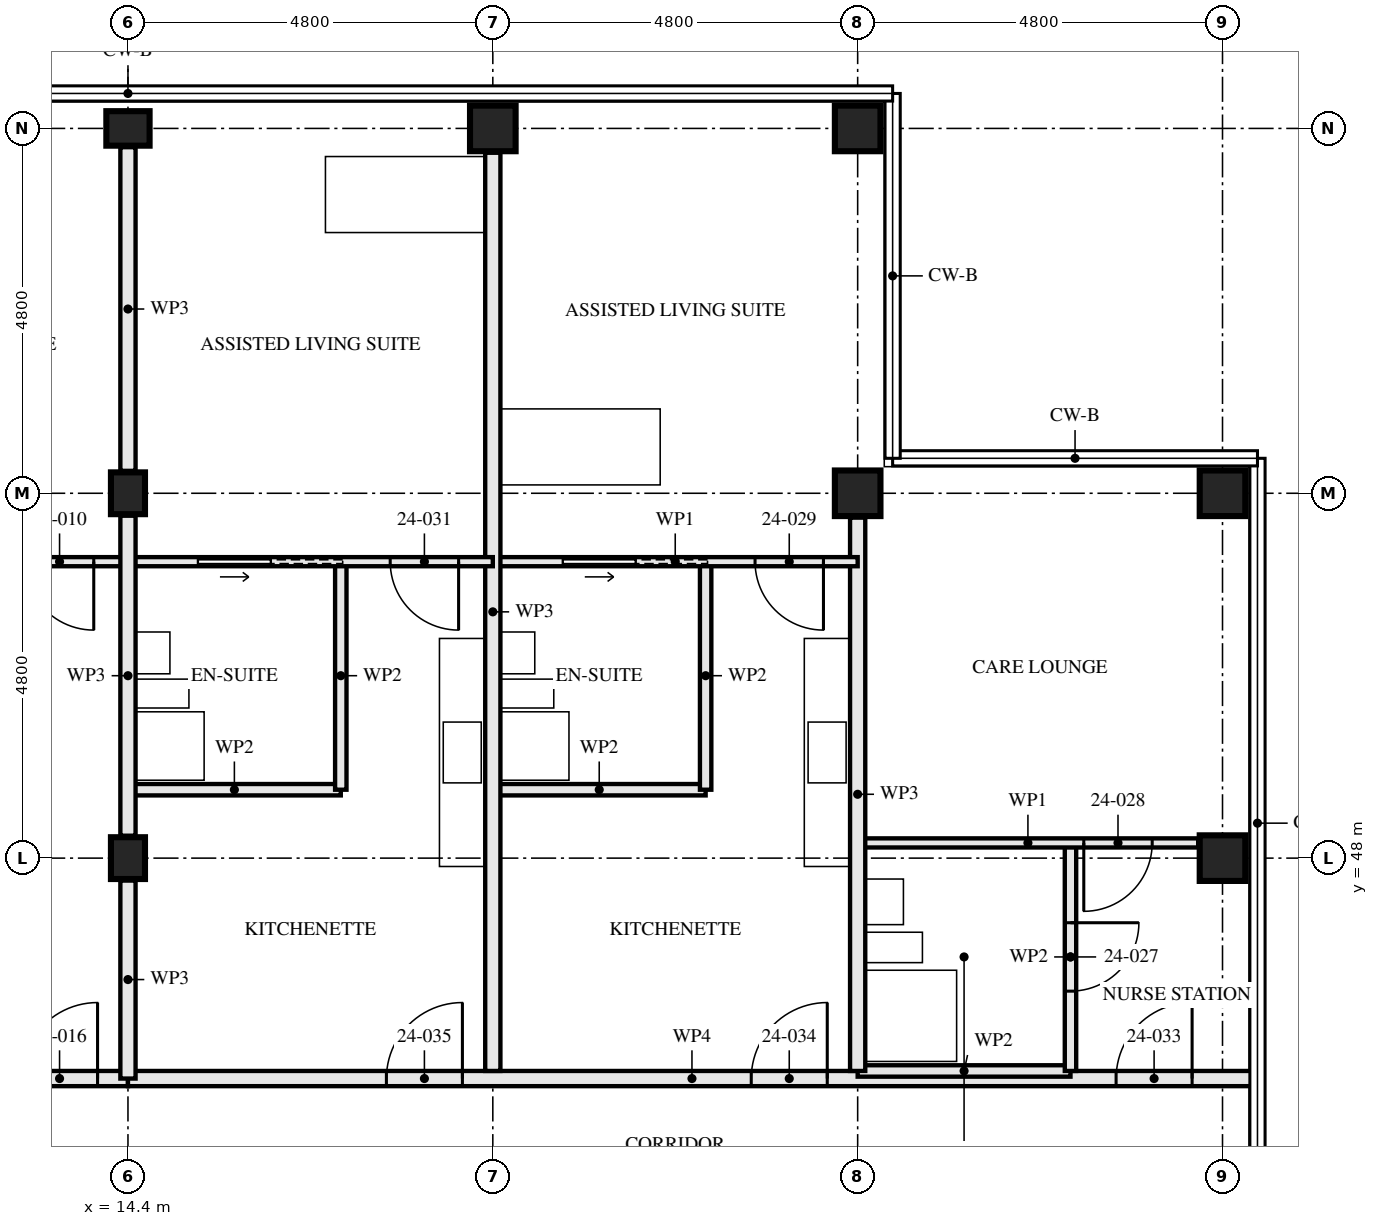
"""IFC4 building model, lengths in metres.
Left out: names, types, materials, properties, quantities, classifications, styles, units other than length and angle.
Written with IfcOpenShell. Run it as: python <this file> out.ifc"""

import sys

from ifc_helpers import new_model, si_unit, direction, frame, frame_2d, origin, origin_2d, place, context, subcontext, project, spatial, rectangle, hollow_rectangle, i_section, extrude, element, fill, save


model = new_model("IFC4")
c1 = context("Model", 3, precision=1e-05, world=origin(), true_north=direction((0.0, 1.0)))
c2 = subcontext(c1, "Body", "Model", "MODEL_VIEW")
j1 = project(units=[si_unit("LENGTHUNIT", "METRE"), si_unit("PLANEANGLEUNIT", "RADIAN")], contexts=[c1])
p1 = place(None, origin())
s1 = spatial("IfcSite", under=j1, at=p1, CompositionType="ELEMENT")
p2 = place(p1, origin())
s2 = spatial("IfcBuilding", under=s1, at=p2, CompositionType="ELEMENT")
p3 = place(p2, frame((0.0, 0.0, 91.0)))
s3 = spatial("IfcBuildingStorey", under=s2, at=p3, CompositionType="ELEMENT", Elevation=91.0)
for number, where, z_axis, x_axis in (
    (1, (14.4, 48.0, 0.0), (0.0, 0.0, 1.0), (1.0, 0.0, 0.0)),
    (2, (14.4, 52.8, 0.0), (0.0, 0.0, 1.0), (1.0, 0.0, 0.0)),
):
    element("IfcColumn", number, at=place(p3, frame(where, z_axis=z_axis, x_axis=x_axis)), inside=s3, PredefinedType="COLUMN", context=c2, shape_type="SweptSolid", body=[
        extrude(i_section(OverallWidth=0.448, OverallDepth=0.55, WebThickness=0.072, FlangeThickness=0.115, FilletRadius=0.015, at=origin_2d()), origin(), (0.0, 0.0, 1.0), 3.5),
    ])
p4 = place(p3, frame((14.4, 57.6, 0.0), z_axis=(0.0, 0.0, 1.0), x_axis=(0.0, 1.0, 0.0)))
e3 = element("IfcColumn", 3, at=p4, inside=s3, PredefinedType="COLUMN", context=c2, shape_type="SweptSolid", body=[
    extrude(i_section(OverallWidth=0.454, OverallDepth=0.569, WebThickness=0.078, FlangeThickness=0.125, FilletRadius=0.015, at=origin_2d()), origin(), (0.0, 0.0, 1.0), 3.5),
])
for number, where, z_axis, x_axis in (
    (4, (19.2, 57.6, 0.0), (0.0, 0.0, 1.0), (0.0, 1.0, 0.0)),
    (5, (24.0, 52.8, 0.0), (0.0, 0.0, 1.0), (0.0, 1.0, 0.0)),
    (6, (24.0, 57.6, 0.0), (0.0, 0.0, 1.0), (0.0, 1.0, 0.0)),
    (7, (28.8, 48.0, 0.0), (0.0, 0.0, 1.0), (1.0, 0.0, 0.0)),
    (8, (28.8, 52.8, 0.0), (0.0, 0.0, 1.0), (0.0, 1.0, 0.0)),
):
    element("IfcColumn", number, at=place(p3, frame(where, z_axis=z_axis, x_axis=x_axis)), inside=s3, PredefinedType="COLUMN", context=c2, shape_type="SweptSolid", body=[
        extrude(hollow_rectangle(XDim=0.6, YDim=0.6, WallThickness=0.08, at=origin_2d()), origin(), (0.0, 0.0, 1.0), 3.5),
    ])
p5 = place(p3, frame((14.4, 51.9, 0.0), z_axis=(0.0, 0.0, 1.0), x_axis=(-1.0, 0.0, 0.0)))
e9 = element("IfcWall", 9, at=p5, inside=s3, PredefinedType="PARTITIONING", context=c2, shape_type="SweptSolid", body=[
    extrude(rectangle(XDim=4.8, YDim=0.12, at=frame_2d((2.4, 0.0))), origin(), (0.0, 0.0, 1.0), 3.33),
])
p6 = place(p5, frame((0.45, 0.0, 0.0)))
e10 = element("IfcOpeningElement", 10, at=p6, cuts=e9, PredefinedType="OPENING", context=c2, shape_type="SweptSolid", body=[
    extrude(rectangle(XDim=0.9, YDim=2.1, at=frame_2d((0.45, 1.05))), frame((0.0, 0.071, 0.0), z_axis=(0.0, -1.0, 0.0), x_axis=(1.0, 0.0, 0.0)), (0.0, 0.0, 1.0), 0.141),
])
p7 = place(p5, frame((2.925, 0.0, 0.0)))
e11 = element("IfcOpeningElement", 11, at=p7, cuts=e9, PredefinedType="OPENING", context=c2, shape_type="SweptSolid", body=[
    extrude(rectangle(XDim=0.95, YDim=2.1, at=frame_2d((0.475, 1.05))), frame((0.0, 0.071, 0.0), z_axis=(0.0, -1.0, 0.0), x_axis=(1.0, 0.0, 0.0)), (0.0, 0.0, 1.0), 0.141),
])
p8 = place(p3, frame((14.4, 45.1, 0.0), z_axis=(0.0, 0.0, 1.0), x_axis=(-1.0, 0.0, 0.0)))
e12 = element("IfcWall", 12, at=p8, inside=s3, PredefinedType="PARTITIONING", context=c2, shape_type="SweptSolid", body=[
    extrude(rectangle(XDim=9.6, YDim=0.2, at=frame_2d((4.8, 0.0))), origin(), (0.0, 0.0, 1.0), 3.33),
])
p9 = place(p8, frame((0.4, 0.0, 0.0)))
e13 = element("IfcOpeningElement", 13, at=p9, cuts=e12, PredefinedType="OPENING", context=c2, shape_type="SweptSolid", body=[
    extrude(rectangle(XDim=1.0, YDim=2.1, at=frame_2d((0.5, 1.05))), frame((0.0, 0.111, 0.0), z_axis=(0.0, -1.0, 0.0), x_axis=(1.0, 0.0, 0.0)), (0.0, 0.0, 1.0), 0.221),
])
p10 = place(p8, frame((5.2, 0.0, 0.0)))
e14 = element("IfcOpeningElement", 14, at=p10, cuts=e12, PredefinedType="OPENING", context=c2, shape_type="SweptSolid", body=[
    extrude(rectangle(XDim=1.0, YDim=2.1, at=frame_2d((0.5, 1.05))), frame((0.0, 0.111, 0.0), z_axis=(0.0, -1.0, 0.0), x_axis=(1.0, 0.0, 0.0)), (0.0, 0.0, 1.0), 0.221),
])
p11 = place(p3, frame((26.8, 48.2, 0.0), z_axis=(0.0, 0.0, 1.0), x_axis=(0.0, -1.0, 0.0)))
e15 = element("IfcWall", 15, at=p11, inside=s3, PredefinedType="PARTITIONING", context=c2, shape_type="SweptSolid", body=[
    extrude(rectangle(XDim=3.0, YDim=0.15, at=frame_2d((1.5, 0.0))), origin(), (0.0, 0.0, 1.0), 2.55),
])
p12 = place(p11, frame((1.05, 0.0, 0.0)))
e16 = element("IfcOpeningElement", 16, at=p12, cuts=e15, PredefinedType="OPENING", context=c2, shape_type="SweptSolid", body=[
    extrude(rectangle(XDim=0.9, YDim=2.1, at=frame_2d((0.45, 1.05))), frame((0.0, 0.085, 0.0), z_axis=(0.0, -1.0, 0.0), x_axis=(1.0, 0.0, 0.0)), (0.0, 0.0, 1.0), 0.171),
])
p13 = place(p3, frame((26.8, 45.2, 0.0), z_axis=(0.0, 0.0, 1.0), x_axis=(-1.0, 0.0, 0.0)))
e17 = element("IfcWall", 17, at=p13, inside=s3, PredefinedType="PARTITIONING", context=c2, shape_type="SweptSolid", body=[
    extrude(rectangle(XDim=2.8, YDim=0.15, at=frame_2d((1.4, 0.0))), origin(), (0.0, 0.0, 1.0), 3.33),
])
p14 = place(p3, frame((28.48, 48.2, 0.0), z_axis=(0.0, 0.0, 1.0), x_axis=(-1.0, 0.0, 0.0)))
e18 = element("IfcWall", 18, at=p14, inside=s3, PredefinedType="PARTITIONING", context=c2, shape_type="SweptSolid", body=[
    extrude(rectangle(XDim=4.48, YDim=0.12, at=frame_2d((2.24, 0.0))), origin(), (0.0, 0.0, 1.0), 3.33),
])
p15 = place(p14, frame((0.605, 0.0, 0.0)))
e19 = element("IfcOpeningElement", 19, at=p15, cuts=e18, PredefinedType="OPENING", context=c2, shape_type="SweptSolid", body=[
    extrude(rectangle(XDim=0.9, YDim=2.1, at=frame_2d((0.45, 1.05))), frame((0.0, 0.071, 0.0), z_axis=(0.0, -1.0, 0.0), x_axis=(1.0, 0.0, 0.0)), (0.0, 0.0, 1.0), 0.141),
])
p16 = place(p3, frame((24.0, 52.48, 0.0), z_axis=(0.0, 0.0, 1.0), x_axis=(0.0, -1.0, 0.0)))
e20 = element("IfcWall", 20, at=p16, inside=s3, PredefinedType="PARTITIONING", context=c2, shape_type="SweptSolid", body=[
    extrude(rectangle(XDim=7.28, YDim=0.2, at=frame_2d((3.64, 0.0))), origin(), (0.0, 0.0, 1.0), 2.55),
])
p17 = place(p3, frame((22.0, 51.9, 0.0), z_axis=(0.0, 0.0, 1.0), x_axis=(0.0, -1.0, 0.0)))
e21 = element("IfcWall", 21, at=p17, inside=s3, PredefinedType="PARTITIONING", context=c2, shape_type="SweptSolid", body=[
    extrude(rectangle(XDim=3.0, YDim=0.15, at=frame_2d((1.5, 0.0))), origin(), (0.0, 0.0, 1.0), 3.33),
])
p18 = place(p3, frame((22.0, 48.9, 0.0), z_axis=(0.0, 0.0, 1.0), x_axis=(-1.0, 0.0, 0.0)))
e22 = element("IfcWall", 22, at=p18, inside=s3, PredefinedType="PARTITIONING", context=c2, shape_type="SweptSolid", body=[
    extrude(rectangle(XDim=2.8, YDim=0.15, at=frame_2d((1.4, 0.0))), origin(), (0.0, 0.0, 1.0), 3.33),
])
p19 = place(p3, frame((24.0, 51.9, 0.0), z_axis=(0.0, 0.0, 1.0), x_axis=(-1.0, 0.0, 0.0)))
e23 = element("IfcWall", 23, at=p19, inside=s3, PredefinedType="PARTITIONING", context=c2, shape_type="SweptSolid", body=[
    extrude(rectangle(XDim=4.8, YDim=0.12, at=frame_2d((2.4, 0.0))), origin(), (0.0, 0.0, 1.0), 3.33),
])
p20 = place(p19, frame((0.45, 0.0, 0.0)))
e24 = element("IfcOpeningElement", 24, at=p20, cuts=e23, PredefinedType="OPENING", context=c2, shape_type="SweptSolid", body=[
    extrude(rectangle(XDim=0.9, YDim=2.1, at=frame_2d((0.45, 1.05))), frame((0.0, 0.071, 0.0), z_axis=(0.0, -1.0, 0.0), x_axis=(1.0, 0.0, 0.0)), (0.0, 0.0, 1.0), 0.141),
])
p21 = place(p19, frame((2.925, 0.0, 0.0)))
e25 = element("IfcOpeningElement", 25, at=p21, cuts=e23, PredefinedType="OPENING", context=c2, shape_type="SweptSolid", body=[
    extrude(rectangle(XDim=0.95, YDim=2.1, at=frame_2d((0.475, 1.05))), frame((0.0, 0.071, 0.0), z_axis=(0.0, -1.0, 0.0), x_axis=(1.0, 0.0, 0.0)), (0.0, 0.0, 1.0), 0.141),
])
p22 = place(p3, frame((19.2, 57.28, 0.0), z_axis=(0.0, 0.0, 1.0), x_axis=(0.0, -1.0, 0.0)))
e26 = element("IfcWall", 26, at=p22, inside=s3, PredefinedType="PARTITIONING", context=c2, shape_type="SweptSolid", body=[
    extrude(rectangle(XDim=12.08, YDim=0.2, at=frame_2d((6.04, 0.0))), origin(), (0.0, 0.0, 1.0), 2.55),
])
p23 = place(p3, frame((17.2, 51.9, 0.0), z_axis=(0.0, 0.0, 1.0), x_axis=(0.0, -1.0, 0.0)))
e27 = element("IfcWall", 27, at=p23, inside=s3, PredefinedType="PARTITIONING", context=c2, shape_type="SweptSolid", body=[
    extrude(rectangle(XDim=3.0, YDim=0.15, at=frame_2d((1.5, 0.0))), origin(), (0.0, 0.0, 1.0), 3.33),
])
p24 = place(p3, frame((17.2, 48.9, 0.0), z_axis=(0.0, 0.0, 1.0), x_axis=(-1.0, 0.0, 0.0)))
e28 = element("IfcWall", 28, at=p24, inside=s3, PredefinedType="PARTITIONING", context=c2, shape_type="SweptSolid", body=[
    extrude(rectangle(XDim=2.8, YDim=0.15, at=frame_2d((1.4, 0.0))), origin(), (0.0, 0.0, 1.0), 3.33),
])
p25 = place(p3, frame((19.2, 51.9, 0.0), z_axis=(0.0, 0.0, 1.0), x_axis=(-1.0, 0.0, 0.0)))
e29 = element("IfcWall", 29, at=p25, inside=s3, PredefinedType="PARTITIONING", context=c2, shape_type="SweptSolid", body=[
    extrude(rectangle(XDim=4.8, YDim=0.12, at=frame_2d((2.4, 0.0))), origin(), (0.0, 0.0, 1.0), 3.33),
])
p26 = place(p25, frame((0.45, 0.0, 0.0)))
e30 = element("IfcOpeningElement", 30, at=p26, cuts=e29, PredefinedType="OPENING", context=c2, shape_type="SweptSolid", body=[
    extrude(rectangle(XDim=0.9, YDim=2.1, at=frame_2d((0.45, 1.05))), frame((0.0, 0.071, 0.0), z_axis=(0.0, -1.0, 0.0), x_axis=(1.0, 0.0, 0.0)), (0.0, 0.0, 1.0), 0.141),
])
p27 = place(p25, frame((2.925, 0.0, 0.0)))
e31 = element("IfcOpeningElement", 31, at=p27, cuts=e29, PredefinedType="OPENING", context=c2, shape_type="SweptSolid", body=[
    extrude(rectangle(XDim=0.95, YDim=2.1, at=frame_2d((0.475, 1.05))), frame((0.0, 0.071, 0.0), z_axis=(0.0, -1.0, 0.0), x_axis=(1.0, 0.0, 0.0)), (0.0, 0.0, 1.0), 0.141),
])
p28 = place(p3, frame((29.24, 45.1, 0.0), z_axis=(0.0, 0.0, 1.0), x_axis=(-1.0, 0.0, 0.0)))
e32 = element("IfcWall", 32, at=p28, inside=s3, PredefinedType="PARTITIONING", context=c2, shape_type="SweptSolid", body=[
    extrude(rectangle(XDim=14.84, YDim=0.2, at=frame_2d((7.42, 0.0))), origin(), (0.0, 0.0, 1.0), 2.32),
])
p29 = place(p28, frame((0.84, 0.0, 0.0)))
e33 = element("IfcOpeningElement", 33, at=p29, cuts=e32, PredefinedType="OPENING", context=c2, shape_type="SweptSolid", body=[
    extrude(rectangle(XDim=1.0, YDim=2.1, at=frame_2d((0.5, 1.05))), frame((0.0, 0.111, 0.0), z_axis=(0.0, -1.0, 0.0), x_axis=(1.0, 0.0, 0.0)), (0.0, 0.0, 1.0), 0.221),
])
p30 = place(p28, frame((5.64, 0.0, 0.0)))
e34 = element("IfcOpeningElement", 34, at=p30, cuts=e32, PredefinedType="OPENING", context=c2, shape_type="SweptSolid", body=[
    extrude(rectangle(XDim=1.0, YDim=2.1, at=frame_2d((0.5, 1.05))), frame((0.0, 0.111, 0.0), z_axis=(0.0, -1.0, 0.0), x_axis=(1.0, 0.0, 0.0)), (0.0, 0.0, 1.0), 0.221),
])
p31 = place(p28, frame((10.44, 0.0, 0.0)))
e35 = element("IfcOpeningElement", 35, at=p31, cuts=e32, PredefinedType="OPENING", context=c2, shape_type="SweptSolid", body=[
    extrude(rectangle(XDim=1.0, YDim=2.1, at=frame_2d((0.5, 1.05))), frame((0.0, 0.111, 0.0), z_axis=(0.0, -1.0, 0.0), x_axis=(1.0, 0.0, 0.0)), (0.0, 0.0, 1.0), 0.221),
])
p32 = place(p3, frame((14.4, 45.1, 0.0), z_axis=(0.0, 0.0, 1.0), x_axis=(0.0, 1.0, 0.0)))
e36 = element("IfcWall", 36, at=p32, inside=s3, PredefinedType="PARTITIONING", context=c2, shape_type="SweptSolid", body=[
    extrude(rectangle(XDim=2.605, YDim=0.2, at=frame_2d((1.302, 0.0))), origin(), (0.0, 0.0, 1.0), 2.32),
])
p33 = place(p3, frame((14.4, 48.295, 0.0), z_axis=(0.0, 0.0, 1.0), x_axis=(0.0, 1.0, 0.0)))
e37 = element("IfcWall", 37, at=p33, inside=s3, PredefinedType="PARTITIONING", context=c2, shape_type="SweptSolid", body=[
    extrude(rectangle(XDim=4.21, YDim=0.2, at=frame_2d((2.105, 0.0))), origin(), (0.0, 0.0, 1.0), 2.32),
])
p34 = place(p3, frame((14.4, 53.095, 0.0), z_axis=(0.0, 0.0, 1.0), x_axis=(0.0, 1.0, 0.0)))
e38 = element("IfcWall", 38, at=p34, inside=s3, PredefinedType="PARTITIONING", context=c2, shape_type="SweptSolid", body=[
    extrude(rectangle(XDim=4.258, YDim=0.2, at=frame_2d((2.129, 0.0))), origin(), (0.0, 0.0, 1.0), 2.32),
])
p35 = place(p6, origin())
e39 = element("IfcDoor", 39, at=p35, inside=s3, OperationType="SINGLE_SWING_RIGHT", PredefinedType="DOOR", context=c2, shape_type="SweptSolid", body=[
    extrude(rectangle(XDim=0.9, YDim=2.1, at=frame_2d((0.45, 1.05))), frame((0.0, 0.022, 0.0), z_axis=(0.0, -1.0, 0.0), x_axis=(1.0, 0.0, 0.0)), (0.0, 0.0, 1.0), 0.044),
])
fill(e10, e39)
p36 = place(p9, frame((1.0, 0.0, 0.0), z_axis=(0.0, 0.0, 1.0), x_axis=(-1.0, 0.0, 0.0)))
e40 = element("IfcDoor", 40, at=p36, inside=s3, OperationType="SINGLE_SWING_LEFT", PredefinedType="DOOR", context=c2, shape_type="SweptSolid", body=[
    extrude(rectangle(XDim=1.0, YDim=2.1, at=frame_2d((0.5, 1.05))), frame((0.0, 0.027, 0.0), z_axis=(0.0, -1.0, 0.0), x_axis=(1.0, 0.0, 0.0)), (0.0, 0.0, 1.0), 0.054),
])
fill(e13, e40)
p37 = place(p12, origin())
e41 = element("IfcDoor", 41, at=p37, inside=s3, OperationType="SINGLE_SWING_RIGHT", PredefinedType="DOOR", context=c2, shape_type="SweptSolid", body=[
    extrude(rectangle(XDim=0.9, YDim=2.1, at=frame_2d((0.45, 1.05))), frame((0.0, 0.022, 0.0), z_axis=(0.0, -1.0, 0.0), x_axis=(1.0, 0.0, 0.0)), (0.0, 0.0, 1.0), 0.044),
])
fill(e16, e41)
p38 = place(p15, origin())
e42 = element("IfcDoor", 42, at=p38, inside=s3, OperationType="SINGLE_SWING_LEFT", PredefinedType="DOOR", context=c2, shape_type="SweptSolid", body=[
    extrude(rectangle(XDim=0.9, YDim=2.1, at=frame_2d((0.45, 1.05))), frame((0.0, 0.022, 0.0), z_axis=(0.0, -1.0, 0.0), x_axis=(1.0, 0.0, 0.0)), (0.0, 0.0, 1.0), 0.044),
])
fill(e19, e42)
p39 = place(p20, origin())
e43 = element("IfcDoor", 43, at=p39, inside=s3, OperationType="SINGLE_SWING_RIGHT", PredefinedType="DOOR", context=c2, shape_type="SweptSolid", body=[
    extrude(rectangle(XDim=0.9, YDim=2.1, at=frame_2d((0.45, 1.05))), frame((0.0, 0.022, 0.0), z_axis=(0.0, -1.0, 0.0), x_axis=(1.0, 0.0, 0.0)), (0.0, 0.0, 1.0), 0.044),
])
fill(e24, e43)
p40 = place(p21, origin())
e44 = element("IfcDoor", 44, at=p40, inside=s3, OperationType="SLIDING_TO_RIGHT", PredefinedType="DOOR", context=c2, shape_type="SweptSolid", body=[
    extrude(rectangle(XDim=0.95, YDim=2.1, at=frame_2d((0.475, 1.05))), frame((0.0, 0.022, 0.0), z_axis=(0.0, -1.0, 0.0), x_axis=(1.0, 0.0, 0.0)), (0.0, 0.0, 1.0), 0.044),
])
fill(e25, e44)
p41 = place(p26, origin())
e45 = element("IfcDoor", 45, at=p41, inside=s3, OperationType="SINGLE_SWING_RIGHT", PredefinedType="DOOR", context=c2, shape_type="SweptSolid", body=[
    extrude(rectangle(XDim=0.9, YDim=2.1, at=frame_2d((0.45, 1.05))), frame((0.0, 0.022, 0.0), z_axis=(0.0, -1.0, 0.0), x_axis=(1.0, 0.0, 0.0)), (0.0, 0.0, 1.0), 0.044),
])
fill(e30, e45)
p42 = place(p27, origin())
e46 = element("IfcDoor", 46, at=p42, inside=s3, OperationType="SLIDING_TO_RIGHT", PredefinedType="DOOR", context=c2, shape_type="SweptSolid", body=[
    extrude(rectangle(XDim=0.95, YDim=2.1, at=frame_2d((0.475, 1.05))), frame((0.0, 0.022, 0.0), z_axis=(0.0, -1.0, 0.0), x_axis=(1.0, 0.0, 0.0)), (0.0, 0.0, 1.0), 0.044),
])
fill(e31, e46)
p43 = place(p29, frame((1.0, 0.0, 0.0), z_axis=(0.0, 0.0, 1.0), x_axis=(-1.0, 0.0, 0.0)))
e47 = element("IfcDoor", 47, at=p43, inside=s3, OperationType="SINGLE_SWING_LEFT", PredefinedType="DOOR", context=c2, shape_type="SweptSolid", body=[
    extrude(rectangle(XDim=1.0, YDim=2.1, at=frame_2d((0.5, 1.05))), frame((0.0, 0.027, 0.0), z_axis=(0.0, -1.0, 0.0), x_axis=(1.0, 0.0, 0.0)), (0.0, 0.0, 1.0), 0.054),
])
fill(e33, e47)
p44 = place(p30, frame((1.0, 0.0, 0.0), z_axis=(0.0, 0.0, 1.0), x_axis=(-1.0, 0.0, 0.0)))
e48 = element("IfcDoor", 48, at=p44, inside=s3, OperationType="SINGLE_SWING_LEFT", PredefinedType="DOOR", context=c2, shape_type="SweptSolid", body=[
    extrude(rectangle(XDim=1.0, YDim=2.1, at=frame_2d((0.5, 1.05))), frame((0.0, 0.027, 0.0), z_axis=(0.0, -1.0, 0.0), x_axis=(1.0, 0.0, 0.0)), (0.0, 0.0, 1.0), 0.054),
])
fill(e34, e48)
p45 = place(p31, frame((1.0, 0.0, 0.0), z_axis=(0.0, 0.0, 1.0), x_axis=(-1.0, 0.0, 0.0)))
e49 = element("IfcDoor", 49, at=p45, inside=s3, OperationType="SINGLE_SWING_LEFT", PredefinedType="DOOR", context=c2, shape_type="SweptSolid", body=[
    extrude(rectangle(XDim=1.0, YDim=2.1, at=frame_2d((0.5, 1.05))), frame((0.0, 0.027, 0.0), z_axis=(0.0, -1.0, 0.0), x_axis=(1.0, 0.0, 0.0)), (0.0, 0.0, 1.0), 0.054),
])
fill(e35, e49)
save(model, sys.argv[1])
